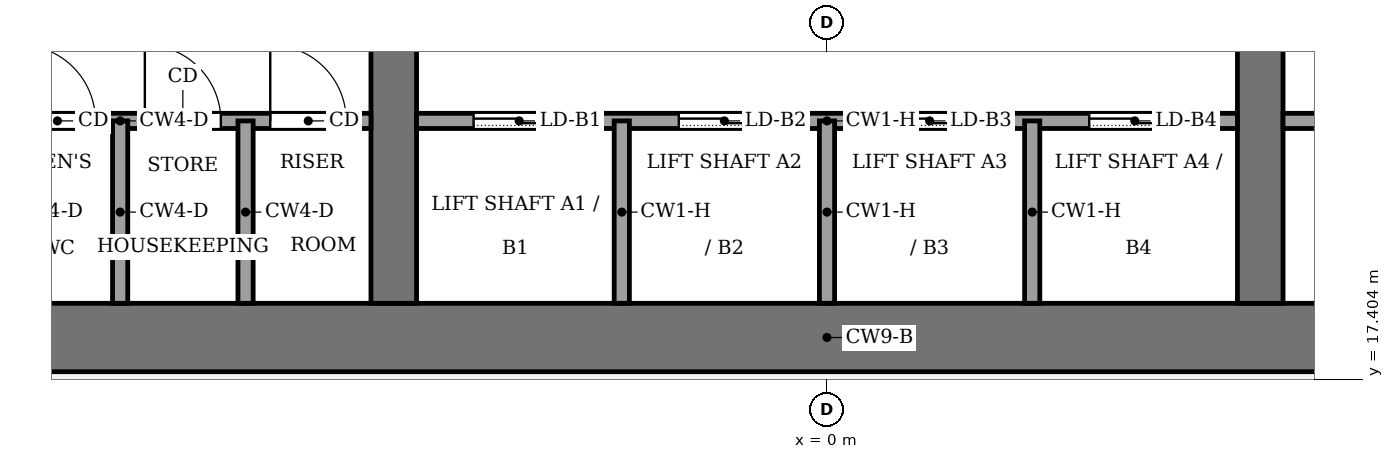
"""IFC4 building model, lengths in metres.
Left out: names, types, materials, properties, quantities, classifications, styles, units other than length and angle.
Written with IfcOpenShell. Run it as: python <this file> out.ifc"""

import sys

from ifc_helpers import new_model, si_unit, direction, frame, frame_2d, origin, place, context, subcontext, project, spatial, rectangle, extrude, element, fill, save


model = new_model("IFC4")
c1 = context("Model", 3, precision=1e-05, world=origin(), true_north=direction((0.0, 1.0)))
c2 = subcontext(c1, "Body", "Model", "MODEL_VIEW")
j1 = project(units=[si_unit("LENGTHUNIT", "METRE"), si_unit("PLANEANGLEUNIT", "RADIAN")], contexts=[c1])
p1 = place(None, origin())
s1 = spatial("IfcSite", under=j1, at=p1, CompositionType="ELEMENT")
p2 = place(p1, origin())
s2 = spatial("IfcBuilding", under=s1, at=p2, CompositionType="ELEMENT")
p3 = place(p2, frame((0.0, 0.0, 222.0)))
s3 = spatial("IfcBuildingStorey", under=s2, at=p3, CompositionType="ELEMENT", Elevation=222.0)
p4 = place(p3, frame((-13.5, 17.95, -0.13), z_axis=(0.0, 0.0, 1.0), x_axis=(1.0, 0.0, 0.0)))
e1 = element("IfcWall", 1, at=p4, inside=s3, PredefinedType="SHEAR", context=c2, shape_type="SweptSolid", body=[
    extrude(rectangle(XDim=27.0, YDim=0.9, at=frame_2d((13.5, 0.0))), origin(), (0.0, 0.0, 1.0), 3.88),
])
p5 = place(p3, frame((-5.7, 18.4, -0.13), z_axis=(0.0, 0.0, 1.0), x_axis=(0.0, 1.0, 0.0)))
e2 = element("IfcWall", 2, at=p5, inside=s3, PredefinedType="SHEAR", context=c2, shape_type="SweptSolid", body=[
    extrude(rectangle(XDim=19.2, YDim=0.6, at=frame_2d((9.6, 0.0))), origin(), (0.0, 0.0, 1.0), 3.88),
])
p6 = place(p5, frame((8.35, 0.0, 0.13)))
e3 = element("IfcOpeningElement", 3, at=p6, cuts=e2, PredefinedType="OPENING", context=c2, shape_type="SweptSolid", body=[
    extrude(rectangle(XDim=0.9, YDim=2.1, at=frame_2d((0.45, 1.05))), frame((0.0, 0.31, 0.0), z_axis=(0.0, -1.0, 0.0), x_axis=(1.0, 0.0, 0.0)), (0.0, 0.0, 1.0), 0.62),
])
p7 = place(p3, frame((5.7, 18.4, -0.13), z_axis=(0.0, 0.0, 1.0), x_axis=(0.0, 1.0, 0.0)))
e4 = element("IfcWall", 4, at=p7, inside=s3, PredefinedType="SHEAR", context=c2, shape_type="SweptSolid", body=[
    extrude(rectangle(XDim=19.2, YDim=0.6, at=frame_2d((9.6, 0.0))), origin(), (0.0, 0.0, 1.0), 3.88),
])
p8 = place(p7, frame((8.35, 0.0, 0.13)))
e5 = element("IfcOpeningElement", 5, at=p8, cuts=e4, PredefinedType="OPENING", context=c2, shape_type="SweptSolid", body=[
    extrude(rectangle(XDim=0.9, YDim=2.1, at=frame_2d((0.45, 1.05))), frame((0.0, 0.31, 0.0), z_axis=(0.0, -1.0, 0.0), x_axis=(1.0, 0.0, 0.0)), (0.0, 0.0, 1.0), 0.62),
])
p9 = place(p7, frame((13.3, 0.0, 0.13)))
e6 = element("IfcOpeningElement", 6, at=p9, cuts=e4, PredefinedType="OPENING", context=c2, shape_type="SweptSolid", body=[
    extrude(rectangle(XDim=2.4, YDim=2.4, at=frame_2d((1.2, 1.2))), frame((0.0, 0.31, 0.0), z_axis=(0.0, -1.0, 0.0), x_axis=(1.0, 0.0, 0.0)), (0.0, 0.0, 1.0), 0.62),
])
p10 = place(p3, frame((-12.6, 20.8, 0.0), z_axis=(0.0, 0.0, 1.0), x_axis=(1.0, 0.0, 0.0)))
e7 = element("IfcWall", 7, at=p10, inside=s3, PredefinedType="PARTITIONING", context=c2, shape_type="SweptSolid", body=[
    extrude(rectangle(XDim=6.6, YDim=0.2, at=frame_2d((3.3, 0.0))), origin(), (0.0, 0.0, 1.0), 3.75),
])
p11 = place(p10, frame((0.325, 0.0, 0.0)))
e8 = element("IfcOpeningElement", 8, at=p11, cuts=e7, PredefinedType="OPENING", context=c2, shape_type="SweptSolid", body=[
    extrude(rectangle(XDim=1.0, YDim=2.1, at=frame_2d((0.5, 1.05))), frame((0.0, 0.11, 0.0), z_axis=(0.0, -1.0, 0.0), x_axis=(1.0, 0.0, 0.0)), (0.0, 0.0, 1.0), 0.22),
])
p12 = place(p10, frame((1.975, 0.0, 0.0)))
e9 = element("IfcOpeningElement", 9, at=p12, cuts=e7, PredefinedType="OPENING", context=c2, shape_type="SweptSolid", body=[
    extrude(rectangle(XDim=1.0, YDim=2.1, at=frame_2d((0.5, 1.05))), frame((0.0, 0.11, 0.0), z_axis=(0.0, -1.0, 0.0), x_axis=(1.0, 0.0, 0.0)), (0.0, 0.0, 1.0), 0.22),
])
p13 = place(p10, frame((3.625, 0.0, 0.0)))
e10 = element("IfcOpeningElement", 10, at=p13, cuts=e7, PredefinedType="OPENING", context=c2, shape_type="SweptSolid", body=[
    extrude(rectangle(XDim=1.0, YDim=2.1, at=frame_2d((0.5, 1.05))), frame((0.0, 0.11, 0.0), z_axis=(0.0, -1.0, 0.0), x_axis=(1.0, 0.0, 0.0)), (0.0, 0.0, 1.0), 0.22),
])
p14 = place(p10, frame((5.275, 0.0, 0.0)))
e11 = element("IfcOpeningElement", 11, at=p14, cuts=e7, PredefinedType="OPENING", context=c2, shape_type="SweptSolid", body=[
    extrude(rectangle(XDim=1.0, YDim=2.1, at=frame_2d((0.5, 1.05))), frame((0.0, 0.11, 0.0), z_axis=(0.0, -1.0, 0.0), x_axis=(1.0, 0.0, 0.0)), (0.0, 0.0, 1.0), 0.22),
])
p15 = place(p3, frame((-5.4, 20.8, 0.0), z_axis=(0.0, 0.0, 1.0), x_axis=(1.0, 0.0, 0.0)))
e12 = element("IfcWall", 12, at=p15, inside=s3, PredefinedType="PARTITIONING", context=c2, shape_type="SweptSolid", body=[
    extrude(rectangle(XDim=10.8, YDim=0.2, at=frame_2d((5.4, 0.0))), origin(), (0.0, 0.0, 1.0), 3.75),
])
p16 = place(p15, frame((0.75, 0.0, 0.0)))
e13 = element("IfcOpeningElement", 13, at=p16, cuts=e12, PredefinedType="OPENING", context=c2, shape_type="SweptSolid", body=[
    extrude(rectangle(XDim=1.2, YDim=2.2, at=frame_2d((0.6, 1.1))), frame((0.0, 0.11, 0.0), z_axis=(0.0, -1.0, 0.0), x_axis=(1.0, 0.0, 0.0)), (0.0, 0.0, 1.0), 0.22),
])
p17 = place(p15, frame((3.45, 0.0, 0.0)))
e14 = element("IfcOpeningElement", 14, at=p17, cuts=e12, PredefinedType="OPENING", context=c2, shape_type="SweptSolid", body=[
    extrude(rectangle(XDim=1.2, YDim=2.2, at=frame_2d((0.6, 1.1))), frame((0.0, 0.11, 0.0), z_axis=(0.0, -1.0, 0.0), x_axis=(1.0, 0.0, 0.0)), (0.0, 0.0, 1.0), 0.22),
])
p18 = place(p15, frame((6.15, 0.0, 0.0)))
e15 = element("IfcOpeningElement", 15, at=p18, cuts=e12, PredefinedType="OPENING", context=c2, shape_type="SweptSolid", body=[
    extrude(rectangle(XDim=1.2, YDim=2.2, at=frame_2d((0.6, 1.1))), frame((0.0, 0.11, 0.0), z_axis=(0.0, -1.0, 0.0), x_axis=(1.0, 0.0, 0.0)), (0.0, 0.0, 1.0), 0.22),
])
p19 = place(p15, frame((8.85, 0.0, 0.0)))
e16 = element("IfcOpeningElement", 16, at=p19, cuts=e12, PredefinedType="OPENING", context=c2, shape_type="SweptSolid", body=[
    extrude(rectangle(XDim=1.2, YDim=2.2, at=frame_2d((0.6, 1.1))), frame((0.0, 0.11, 0.0), z_axis=(0.0, -1.0, 0.0), x_axis=(1.0, 0.0, 0.0)), (0.0, 0.0, 1.0), 0.22),
])
p20 = place(p3, frame((6.0, 20.8, 0.0), z_axis=(0.0, 0.0, 1.0), x_axis=(1.0, 0.0, 0.0)))
e17 = element("IfcWall", 17, at=p20, inside=s3, PredefinedType="PARTITIONING", context=c2, shape_type="SweptSolid", body=[
    extrude(rectangle(XDim=6.6, YDim=0.2, at=frame_2d((3.3, 0.0))), origin(), (0.0, 0.0, 1.0), 3.75),
])
p21 = place(p20, frame((2.8, 0.0, 0.0)))
e18 = element("IfcOpeningElement", 18, at=p21, cuts=e17, PredefinedType="OPENING", context=c2, shape_type="SweptSolid", body=[
    extrude(rectangle(XDim=1.0, YDim=2.1, at=frame_2d((0.5, 1.05))), frame((0.0, 0.11, 0.0), z_axis=(0.0, -1.0, 0.0), x_axis=(1.0, 0.0, 0.0)), (0.0, 0.0, 1.0), 0.22),
])
for number, where, z_axis, x_axis in (
    (19, (-9.3, 18.4, 0.0), (0.0, 0.0, 1.0), (0.0, 1.0, 0.0)),
    (20, (-7.65, 18.4, 0.0), (0.0, 0.0, 1.0), (0.0, 1.0, 0.0)),
    (21, (-2.7, 18.4, 0.0), (0.0, 0.0, 1.0), (0.0, 1.0, 0.0)),
    (22, (0.0, 18.4, 0.0), (0.0, 0.0, 1.0), (0.0, 1.0, 0.0)),
    (23, (2.7, 18.4, 0.0), (0.0, 0.0, 1.0), (0.0, 1.0, 0.0)),
):
    element("IfcWall", number, at=place(p3, frame(where, z_axis=z_axis, x_axis=x_axis)), inside=s3, PredefinedType="PARTITIONING", context=c2, shape_type="SweptSolid", body=[
        extrude(rectangle(XDim=2.4, YDim=0.2, at=frame_2d((1.2, 0.0))), origin(), (0.0, 0.0, 1.0), 3.75),
    ])
p22 = place(p16, origin())
e24 = element("IfcDoor", 24, at=p22, inside=s3, OperationType="SLIDING_TO_LEFT", PredefinedType="DOOR", context=c2, shape_type="SweptSolid", body=[
    extrude(rectangle(XDim=1.2, YDim=2.2, at=frame_2d((0.6, 1.1))), frame((0.0, 0.025, 0.0), z_axis=(0.0, -1.0, 0.0), x_axis=(1.0, 0.0, 0.0)), (0.0, 0.0, 1.0), 0.05),
])
fill(e13, e24)
p23 = place(p17, origin())
e25 = element("IfcDoor", 25, at=p23, inside=s3, OperationType="SLIDING_TO_LEFT", PredefinedType="DOOR", context=c2, shape_type="SweptSolid", body=[
    extrude(rectangle(XDim=1.2, YDim=2.2, at=frame_2d((0.6, 1.1))), frame((0.0, 0.025, 0.0), z_axis=(0.0, -1.0, 0.0), x_axis=(1.0, 0.0, 0.0)), (0.0, 0.0, 1.0), 0.05),
])
fill(e14, e25)
p24 = place(p18, origin())
e26 = element("IfcDoor", 26, at=p24, inside=s3, OperationType="SLIDING_TO_LEFT", PredefinedType="DOOR", context=c2, shape_type="SweptSolid", body=[
    extrude(rectangle(XDim=1.2, YDim=2.2, at=frame_2d((0.6, 1.1))), frame((0.0, 0.025, 0.0), z_axis=(0.0, -1.0, 0.0), x_axis=(1.0, 0.0, 0.0)), (0.0, 0.0, 1.0), 0.05),
])
fill(e15, e26)
p25 = place(p19, origin())
e27 = element("IfcDoor", 27, at=p25, inside=s3, OperationType="SLIDING_TO_LEFT", PredefinedType="DOOR", context=c2, shape_type="SweptSolid", body=[
    extrude(rectangle(XDim=1.2, YDim=2.2, at=frame_2d((0.6, 1.1))), frame((0.0, 0.025, 0.0), z_axis=(0.0, -1.0, 0.0), x_axis=(1.0, 0.0, 0.0)), (0.0, 0.0, 1.0), 0.05),
])
fill(e16, e27)
p26 = place(p12, origin())
e28 = element("IfcDoor", 28, at=p26, inside=s3, OperationType="SINGLE_SWING_RIGHT", PredefinedType="DOOR", context=c2, shape_type="SweptSolid", body=[
    extrude(rectangle(XDim=1.0, YDim=2.1, at=frame_2d((0.5, 1.05))), frame((0.0, 0.025, 0.0), z_axis=(0.0, -1.0, 0.0), x_axis=(1.0, 0.0, 0.0)), (0.0, 0.0, 1.0), 0.05),
])
fill(e9, e28)
p27 = place(p13, origin())
e29 = element("IfcDoor", 29, at=p27, inside=s3, OperationType="SINGLE_SWING_LEFT", PredefinedType="DOOR", context=c2, shape_type="SweptSolid", body=[
    extrude(rectangle(XDim=1.0, YDim=2.1, at=frame_2d((0.5, 1.05))), frame((0.0, 0.025, 0.0), z_axis=(0.0, -1.0, 0.0), x_axis=(1.0, 0.0, 0.0)), (0.0, 0.0, 1.0), 0.05),
])
fill(e10, e29)
p28 = place(p14, origin())
e30 = element("IfcDoor", 30, at=p28, inside=s3, OperationType="SINGLE_SWING_LEFT", PredefinedType="DOOR", context=c2, shape_type="SweptSolid", body=[
    extrude(rectangle(XDim=1.0, YDim=2.1, at=frame_2d((0.5, 1.05))), frame((0.0, 0.025, 0.0), z_axis=(0.0, -1.0, 0.0), x_axis=(1.0, 0.0, 0.0)), (0.0, 0.0, 1.0), 0.05),
])
fill(e11, e30)
save(model, sys.argv[1])
